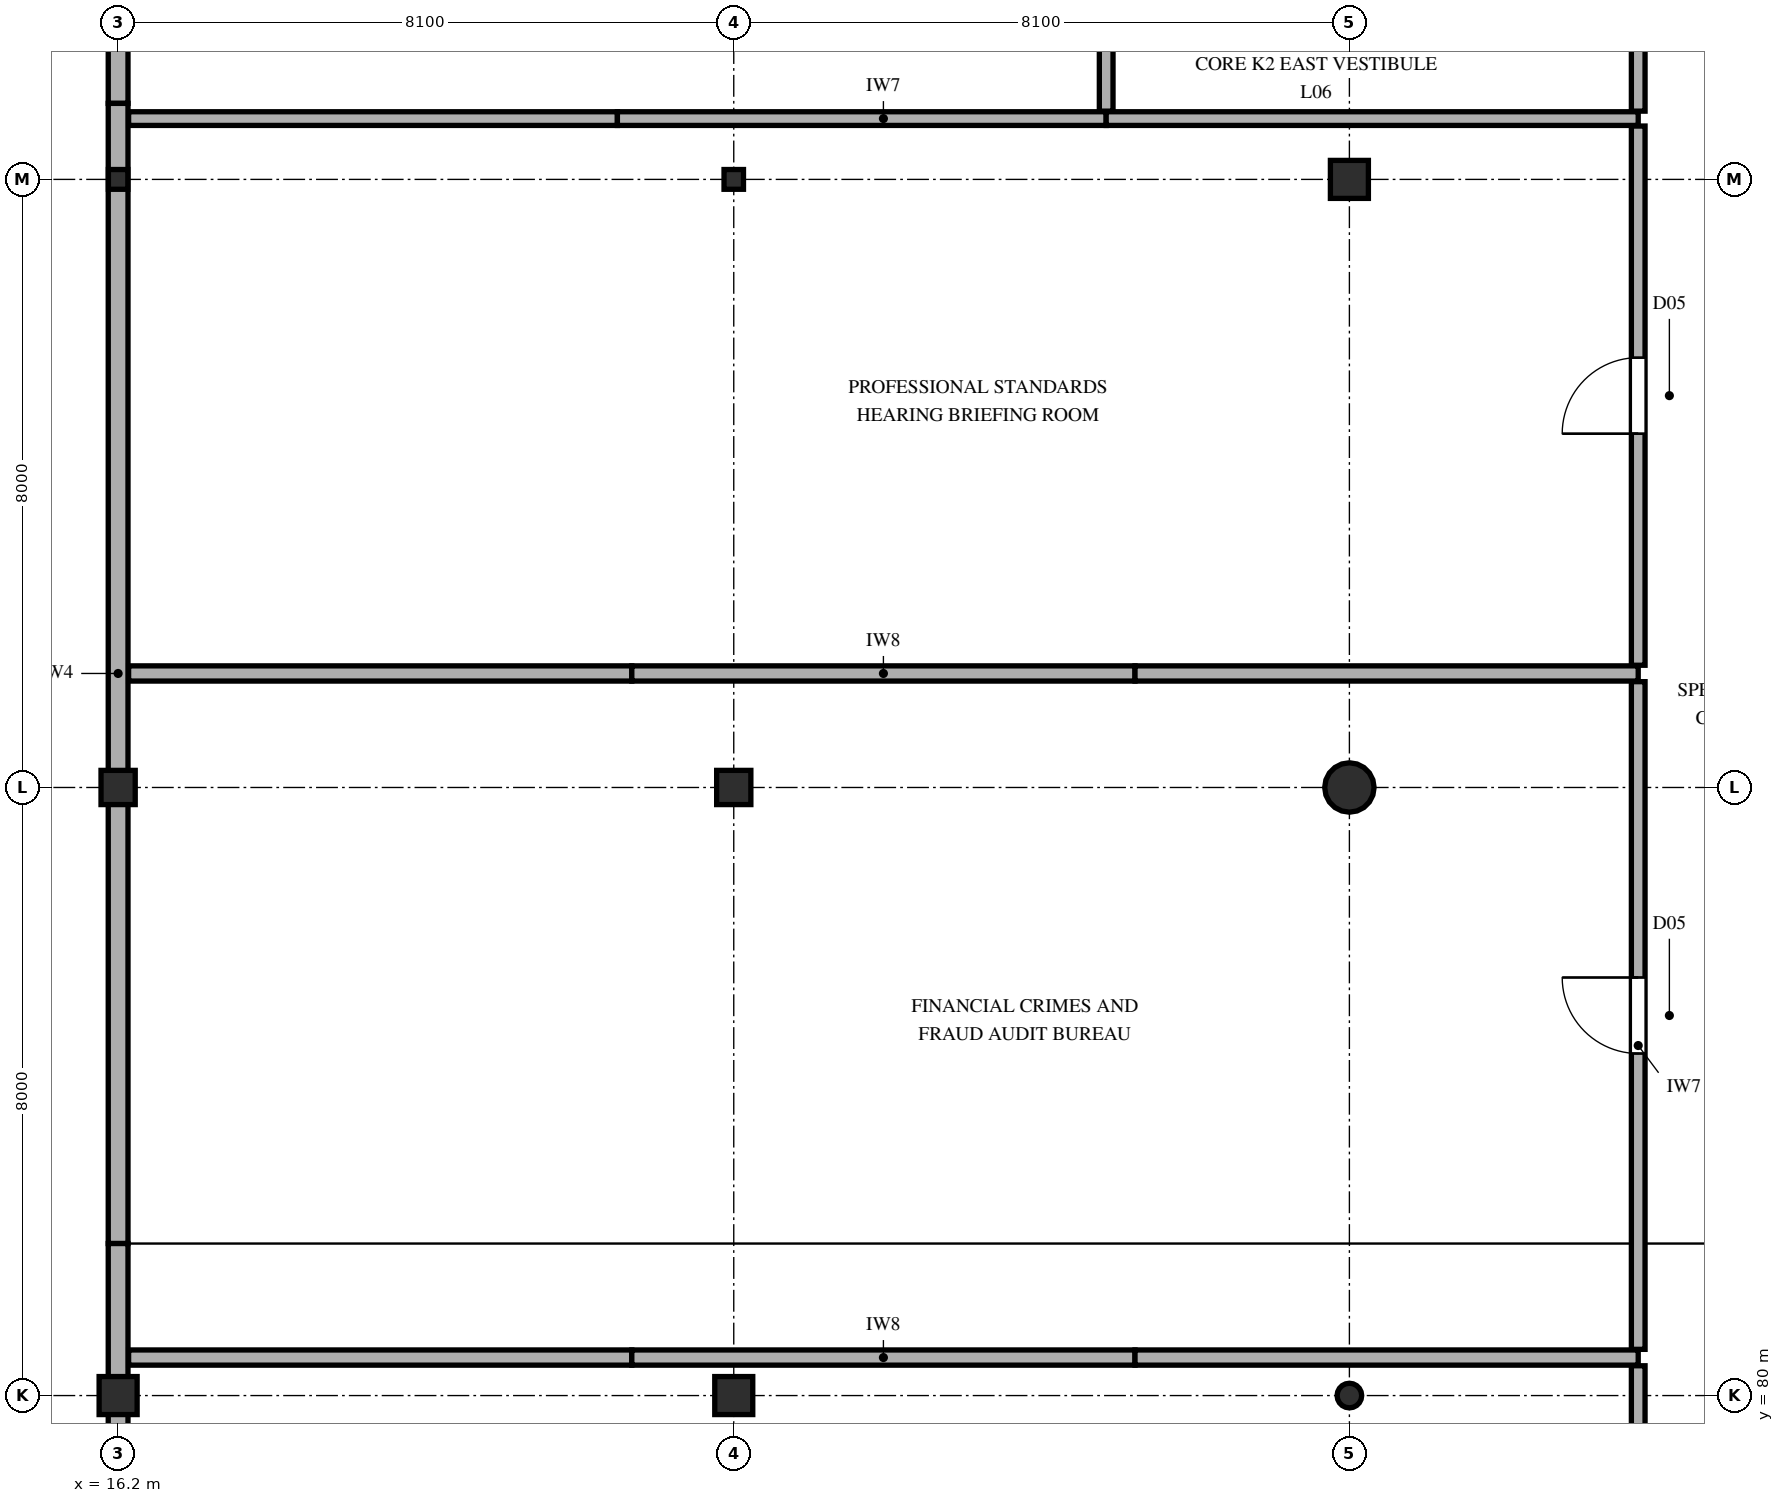
"""IFC4 building model, lengths in metres.
Left out: names, types, materials, properties, quantities, classifications, styles, units other than length and angle.
Written with IfcOpenShell. Run it as: python <this file> out.ifc"""

import sys

from ifc_helpers import new_model, si_unit, direction, frame, frame_2d, origin, origin_2d, place, context, subcontext, project, spatial, rectangle, circle, hollow_circle, i_section, extrude, element, fill, save


model = new_model("IFC4")
c1 = context("Model", 3, precision=1e-05, world=origin(), true_north=direction((0.0, 1.0)))
c2 = subcontext(c1, "Body", "Model", "MODEL_VIEW")
j1 = project(units=[si_unit("LENGTHUNIT", "METRE"), si_unit("PLANEANGLEUNIT", "RADIAN")], contexts=[c1])
p1 = place(None, origin())
s1 = spatial("IfcSite", under=j1, at=p1, CompositionType="ELEMENT")
p2 = place(p1, origin())
s2 = spatial("IfcBuilding", under=s1, at=p2, CompositionType="ELEMENT")
p3 = place(p2, frame((0.0, 0.0, 29.1)))
s3 = spatial("IfcBuildingStorey", under=s2, at=p3, CompositionType="ELEMENT", Elevation=29.1)
p4 = place(p3, frame((16.2, 80.0, 0.0), z_axis=(0.0, 0.0, 1.0), x_axis=(1.0, 0.0, 0.0)))
e1 = element("IfcColumn", 1, at=p4, inside=s3, PredefinedType="COLUMN", context=c2, shape_type="SweptSolid", body=[
    extrude(rectangle(XDim=0.5, YDim=0.5, at=origin_2d()), origin(), (0.0, 0.0, 1.0), 4.2),
])
p5 = place(p3, frame((16.2, 88.0, 0.0), z_axis=(0.0, 0.0, 1.0), x_axis=(1.0, 0.0, 0.0)))
e2 = element("IfcColumn", 2, at=p5, inside=s3, PredefinedType="COLUMN", context=c2, shape_type="SweptSolid", body=[
    extrude(rectangle(XDim=0.45, YDim=0.45, at=origin_2d()), origin(), (0.0, 0.0, 1.0), 4.2),
])
p6 = place(p3, frame((16.2, 96.0, 0.0), z_axis=(0.0, 0.0, 1.0), x_axis=(1.0, 0.0, 0.0)))
e3 = element("IfcColumn", 3, at=p6, inside=s3, PredefinedType="COLUMN", context=c2, shape_type="SweptSolid", body=[
    extrude(i_section(OverallWidth=0.256, OverallDepth=0.26, WebThickness=0.011, FlangeThickness=0.017, FilletRadius=0.013, at=origin_2d()), origin(), (0.0, 0.0, 1.0), 4.2),
])
p7 = place(p3, frame((24.3, 80.0, 0.0), z_axis=(0.0, 0.0, 1.0), x_axis=(1.0, 0.0, 0.0)))
e4 = element("IfcColumn", 4, at=p7, inside=s3, PredefinedType="COLUMN", context=c2, shape_type="SweptSolid", body=[
    extrude(rectangle(XDim=0.5, YDim=0.5, at=origin_2d()), origin(), (0.0, 0.0, 1.0), 4.2),
])
p8 = place(p3, frame((24.3, 88.0, 0.0), z_axis=(0.0, 0.0, 1.0), x_axis=(1.0, 0.0, 0.0)))
e5 = element("IfcColumn", 5, at=p8, inside=s3, PredefinedType="COLUMN", context=c2, shape_type="SweptSolid", body=[
    extrude(rectangle(XDim=0.45, YDim=0.45, at=origin_2d()), origin(), (0.0, 0.0, 1.0), 4.2),
])
p9 = place(p3, frame((24.3, 96.0, 0.0), z_axis=(0.0, 0.0, 1.0), x_axis=(1.0, 0.0, 0.0)))
e6 = element("IfcColumn", 6, at=p9, inside=s3, PredefinedType="COLUMN", context=c2, shape_type="SweptSolid", body=[
    extrude(i_section(OverallWidth=0.256, OverallDepth=0.26, WebThickness=0.011, FlangeThickness=0.017, FilletRadius=0.013, at=origin_2d()), origin(), (0.0, 0.0, 1.0), 4.2),
])
p10 = place(p3, frame((32.4, 80.0, 0.0), z_axis=(0.0, 0.0, 1.0), x_axis=(1.0, 0.0, 0.0)))
e7 = element("IfcColumn", 7, at=p10, inside=s3, PredefinedType="COLUMN", context=c2, shape_type="SweptSolid", body=[
    extrude(hollow_circle(Radius=0.162, WallThickness=0.013, at=origin_2d()), origin(), (0.0, 0.0, 1.0), 4.2),
])
p11 = place(p3, frame((32.4, 88.0, 0.0), z_axis=(0.0, 0.0, 1.0), x_axis=(1.0, 0.0, 0.0)))
e8 = element("IfcColumn", 8, at=p11, inside=s3, PredefinedType="COLUMN", context=c2, shape_type="SweptSolid", body=[
    extrude(circle(Radius=0.325, at=origin_2d()), origin(), (0.0, 0.0, 1.0), 4.2),
])
p12 = place(p3, frame((32.4, 96.0, 0.0), z_axis=(0.0, 0.0, 1.0), x_axis=(1.0, 0.0, 0.0)))
e9 = element("IfcColumn", 9, at=p12, inside=s3, PredefinedType="COLUMN", context=c2, shape_type="SweptSolid", body=[
    extrude(rectangle(XDim=0.5, YDim=0.5, at=origin_2d()), origin(), (0.0, 0.0, 1.0), 4.2),
])
for number, where, z_axis, x_axis in (
    (10, (16.2, 112.0, 0.0), (0.0, 0.0, 1.0), (0.0, -1.0, 0.0)),
    (11, (16.2, 97.0, 0.0), (0.0, 0.0, 1.0), (0.0, -1.0, 0.0)),
    (12, (16.2, 82.0, 0.0), (0.0, 0.0, 1.0), (0.0, -1.0, 0.0)),
):
    element("IfcWall", number, at=place(p3, frame(where, z_axis=z_axis, x_axis=x_axis)), inside=s3, PredefinedType="SOLIDWALL", context=c2, shape_type="SweptSolid", body=[
        extrude(rectangle(XDim=15.0, YDim=0.26, at=frame_2d((7.5, 0.0))), origin(), (0.0, 0.0, 1.0), 3.452),
    ])
p13 = place(p3, frame((16.338, 80.5, 0.0), z_axis=(0.0, 0.0, 1.0), x_axis=(1.0, 0.0, 0.0)))
e13 = element("IfcWall", 13, at=p13, inside=s3, PredefinedType="PARTITIONING", context=c2, shape_type="SweptSolid", body=[
    extrude(rectangle(XDim=6.621, YDim=0.2, at=frame_2d((3.311, 0.0))), origin(), (0.0, 0.0, 1.0), 3.96),
])
for number, where, z_axis, x_axis in (
    (14, (22.959, 80.5, 0.0), (0.0, 0.0, 1.0), (1.0, 0.0, 0.0)),
    (15, (29.579, 80.5, 0.0), (0.0, 0.0, 1.0), (1.0, 0.0, 0.0)),
):
    element("IfcWall", number, at=place(p3, frame(where, z_axis=z_axis, x_axis=x_axis)), inside=s3, PredefinedType="PARTITIONING", context=c2, shape_type="SweptSolid", body=[
        extrude(rectangle(XDim=6.621, YDim=0.2, at=frame_2d((3.31, 0.0))), origin(), (0.0, 0.0, 1.0), 3.96),
    ])
p14 = place(p3, frame((16.338, 89.5, 0.0), z_axis=(0.0, 0.0, 1.0), x_axis=(1.0, 0.0, 0.0)))
e16 = element("IfcWall", 16, at=p14, inside=s3, PredefinedType="PARTITIONING", context=c2, shape_type="SweptSolid", body=[
    extrude(rectangle(XDim=6.621, YDim=0.2, at=frame_2d((3.311, 0.0))), origin(), (0.0, 0.0, 1.0), 3.96),
])
for number, where, z_axis, x_axis in (
    (17, (22.959, 89.5, 0.0), (0.0, 0.0, 1.0), (1.0, 0.0, 0.0)),
    (18, (29.579, 89.5, 0.0), (0.0, 0.0, 1.0), (1.0, 0.0, 0.0)),
):
    element("IfcWall", number, at=place(p3, frame(where, z_axis=z_axis, x_axis=x_axis)), inside=s3, PredefinedType="PARTITIONING", context=c2, shape_type="SweptSolid", body=[
        extrude(rectangle(XDim=6.621, YDim=0.2, at=frame_2d((3.31, 0.0))), origin(), (0.0, 0.0, 1.0), 3.96),
    ])
p15 = place(p3, frame((16.338, 96.8, 0.0), z_axis=(0.0, 0.0, 1.0), x_axis=(1.0, 0.0, 0.0)))
e19 = element("IfcWall", 19, at=p15, inside=s3, PredefinedType="PARTITIONING", context=c2, shape_type="SweptSolid", body=[
    extrude(rectangle(XDim=6.431, YDim=0.18, at=frame_2d((3.216, 0.0))), origin(), (0.0, 0.0, 1.0), 3.96),
])
p16 = place(p3, frame((22.769, 96.8, 0.0), z_axis=(0.0, 0.0, 1.0), x_axis=(1.0, 0.0, 0.0)))
e20 = element("IfcWall", 20, at=p16, inside=s3, PredefinedType="PARTITIONING", context=c2, shape_type="SweptSolid", body=[
    extrude(rectangle(XDim=6.431, YDim=0.18, at=frame_2d((3.215, 0.0))), origin(), (0.0, 0.0, 1.0), 3.96),
])
p17 = place(p3, frame((29.2, 96.8, 0.0), z_axis=(0.0, 0.0, 1.0), x_axis=(1.0, 0.0, 0.0)))
e21 = element("IfcWall", 21, at=p17, inside=s3, PredefinedType="PARTITIONING", context=c2, shape_type="SweptSolid", body=[
    extrude(rectangle(XDim=7.0, YDim=0.18, at=frame_2d((3.5, 0.0))), origin(), (0.0, 0.0, 1.0), 3.96),
])
p18 = place(p3, frame((29.2, 96.898, 0.0), z_axis=(0.0, 0.0, 1.0), x_axis=(0.0, 1.0, 0.0)))
e22 = element("IfcWall", 22, at=p18, inside=s3, PredefinedType="PARTITIONING", context=c2, shape_type="SweptSolid", body=[
    extrude(rectangle(XDim=3.269, YDim=0.18, at=frame_2d((1.635, 0.0))), origin(), (0.0, 0.0, 1.0), 3.96),
])
p19 = place(p18, frame((1.034, 0.0, 0.0)))
e23 = element("IfcOpeningElement", 23, at=p19, cuts=e22, PredefinedType="OPENING", context=c2, shape_type="SweptSolid", body=[
    extrude(rectangle(XDim=1.2, YDim=2.2, at=frame_2d((0.6, 1.1))), frame((0.0, 0.1, 0.0), z_axis=(0.0, -1.0, 0.0), x_axis=(1.0, 0.0, 0.0)), (0.0, 0.0, 1.0), 0.2),
])
p20 = place(p3, frame((36.2, 68.908, 0.0), z_axis=(0.0, 0.0, 1.0), x_axis=(0.0, 1.0, 0.0)))
e24 = element("IfcWall", 24, at=p20, inside=s3, PredefinedType="PARTITIONING", context=c2, shape_type="SweptSolid", body=[
    extrude(rectangle(XDim=11.484, YDim=0.18, at=frame_2d((5.742, 0.0))), origin(), (0.0, 0.0, 1.0), 3.598),
])
p21 = place(p20, frame((5.192, 0.0, 0.0)))
e25 = element("IfcOpeningElement", 25, at=p21, cuts=e24, PredefinedType="OPENING", context=c2, shape_type="SweptSolid", body=[
    extrude(rectangle(XDim=1.1, YDim=2.2, at=frame_2d((0.55, 1.1))), frame((0.0, 0.1, 0.0), z_axis=(0.0, -1.0, 0.0), x_axis=(1.0, 0.0, 0.0)), (0.0, 0.0, 1.0), 0.2),
])
p22 = place(p3, frame((36.2, 80.608, 0.0), z_axis=(0.0, 0.0, 1.0), x_axis=(0.0, 1.0, 0.0)))
e26 = element("IfcWall", 26, at=p22, inside=s3, PredefinedType="PARTITIONING", context=c2, shape_type="SweptSolid", body=[
    extrude(rectangle(XDim=8.784, YDim=0.18, at=frame_2d((4.392, 0.0))), origin(), (0.0, 0.0, 1.0), 3.545),
])
p23 = place(p22, frame((3.892, 0.0, 0.0)))
e27 = element("IfcOpeningElement", 27, at=p23, cuts=e26, PredefinedType="OPENING", context=c2, shape_type="SweptSolid", body=[
    extrude(rectangle(XDim=1.0, YDim=2.2, at=frame_2d((0.5, 1.1))), frame((0.0, 0.1, 0.0), z_axis=(0.0, -1.0, 0.0), x_axis=(1.0, 0.0, 0.0)), (0.0, 0.0, 1.0), 0.2),
])
p24 = place(p3, frame((36.2, 89.608, 0.0), z_axis=(0.0, 0.0, 1.0), x_axis=(0.0, 1.0, 0.0)))
e28 = element("IfcWall", 28, at=p24, inside=s3, PredefinedType="PARTITIONING", context=c2, shape_type="SweptSolid", body=[
    extrude(rectangle(XDim=7.094, YDim=0.18, at=frame_2d((3.547, 0.0))), origin(), (0.0, 0.0, 1.0), 3.545),
])
p25 = place(p24, frame((3.047, 0.0, 0.0)))
e29 = element("IfcOpeningElement", 29, at=p25, cuts=e28, PredefinedType="OPENING", context=c2, shape_type="SweptSolid", body=[
    extrude(rectangle(XDim=1.0, YDim=2.2, at=frame_2d((0.5, 1.1))), frame((0.0, 0.1, 0.0), z_axis=(0.0, -1.0, 0.0), x_axis=(1.0, 0.0, 0.0)), (0.0, 0.0, 1.0), 0.2),
])
p26 = place(p3, frame((36.2, 96.898, 0.0), z_axis=(0.0, 0.0, 1.0), x_axis=(0.0, 1.0, 0.0)))
e30 = element("IfcWall", 30, at=p26, inside=s3, PredefinedType="PARTITIONING", context=c2, shape_type="SweptSolid", body=[
    extrude(rectangle(XDim=3.404, YDim=0.18, at=frame_2d((1.702, 0.0))), origin(), (0.0, 0.0, 1.0), 3.545),
])
p27 = place(p26, frame((1.152, 0.0, 0.0)))
e31 = element("IfcOpeningElement", 31, at=p27, cuts=e30, PredefinedType="OPENING", context=c2, shape_type="SweptSolid", body=[
    extrude(rectangle(XDim=1.1, YDim=2.2, at=frame_2d((0.55, 1.1))), frame((0.0, 0.1, 0.0), z_axis=(0.0, -1.0, 0.0), x_axis=(1.0, 0.0, 0.0)), (0.0, 0.0, 1.0), 0.2),
])
p28 = place(p23, origin())
e32 = element("IfcDoor", 32, at=p28, inside=s3, OperationType="SINGLE_SWING_RIGHT", PredefinedType="DOOR", context=c2, shape_type="SweptSolid", body=[
    extrude(rectangle(XDim=1.0, YDim=2.2, at=frame_2d((0.5, 1.1))), frame((0.0, 0.025, 0.0), z_axis=(0.0, -1.0, 0.0), x_axis=(1.0, 0.0, 0.0)), (0.0, 0.0, 1.0), 0.05),
])
fill(e27, e32)
p29 = place(p25, origin())
e33 = element("IfcDoor", 33, at=p29, inside=s3, OperationType="SINGLE_SWING_LEFT", PredefinedType="DOOR", context=c2, shape_type="SweptSolid", body=[
    extrude(rectangle(XDim=1.0, YDim=2.2, at=frame_2d((0.5, 1.1))), frame((0.0, 0.025, 0.0), z_axis=(0.0, -1.0, 0.0), x_axis=(1.0, 0.0, 0.0)), (0.0, 0.0, 1.0), 0.05),
])
fill(e29, e33)
save(model, sys.argv[1])
